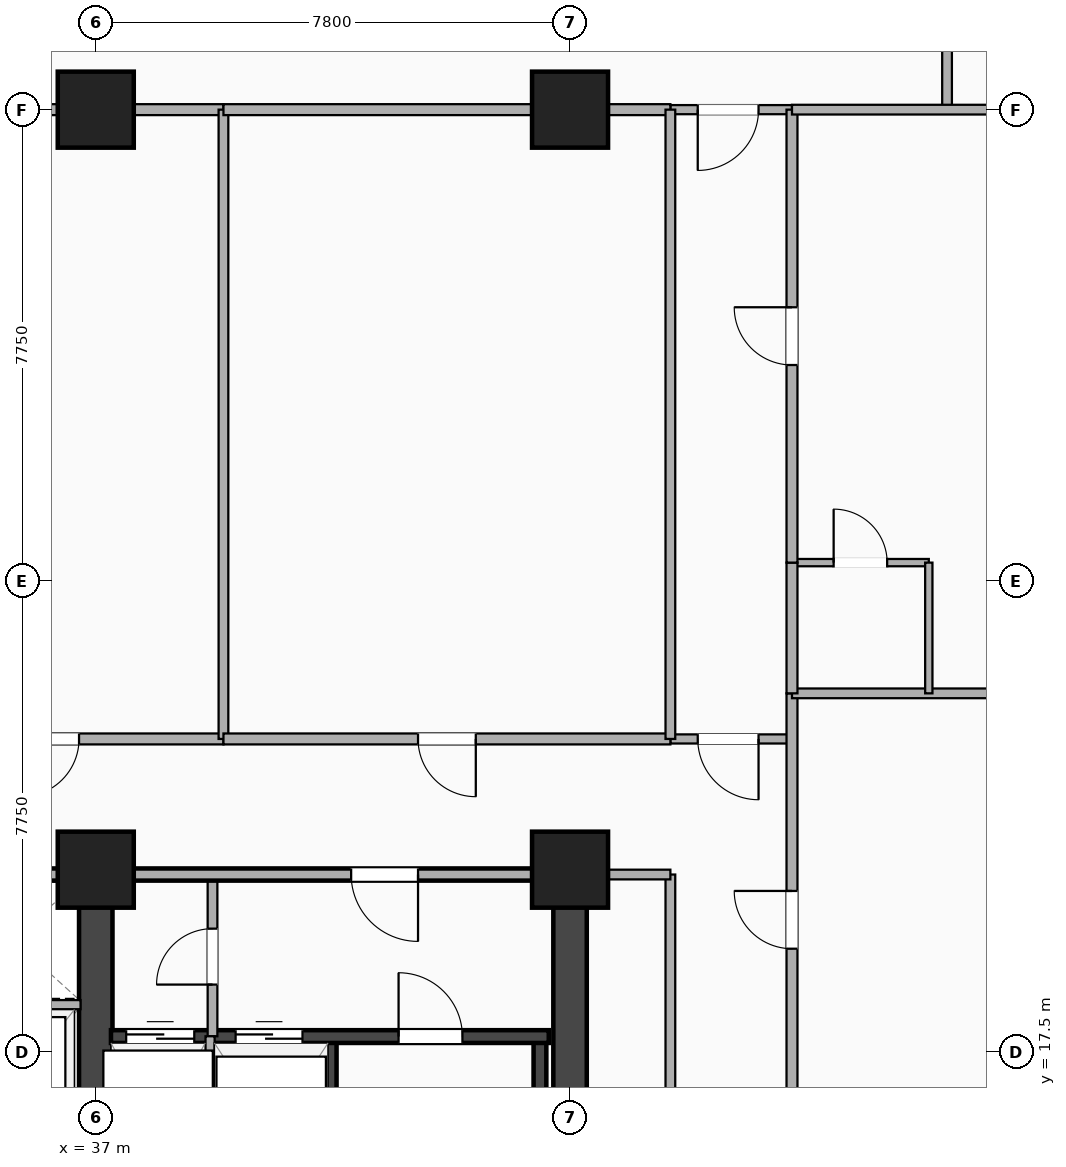
"""IFC4 building model, lengths in metres.
Left out: names, types, materials, properties, quantities, classifications, styles, units other than length and angle.
Written with IfcOpenShell. Run it as: python <this file> out.ifc"""

import sys

from ifc_helpers import new_model, si_unit, direction, frame, frame_2d, origin, origin_2d, place, context, subcontext, project, spatial, rectangle, extrude, element, fill, save


model = new_model("IFC4")
c1 = context("Model", 3, precision=1e-05, world=origin(), true_north=direction((0.0, 1.0)))
c2 = subcontext(c1, "Body", "Model", "MODEL_VIEW")
j1 = project(units=[si_unit("LENGTHUNIT", "METRE"), si_unit("PLANEANGLEUNIT", "RADIAN")], contexts=[c1])
p1 = place(None, origin())
s1 = spatial("IfcSite", under=j1, at=p1, CompositionType="ELEMENT")
p2 = place(p1, origin())
s2 = spatial("IfcBuilding", under=s1, at=p2, CompositionType="ELEMENT")
p3 = place(p2, frame((0.0, 0.0, 95.2)))
s3 = spatial("IfcBuildingStorey", under=s2, at=p3, CompositionType="ELEMENT", Elevation=95.2)
p4 = place(p3, frame((44.8, 3.5, 0.0), z_axis=(0.0, 0.0, 1.0), x_axis=(0.0, 1.0, 0.0)))
e1 = element("IfcWall", 1, at=p4, inside=s3, PredefinedType="SHEAR", context=c2, shape_type="SweptSolid", body=[
    extrude(rectangle(XDim=16.9, YDim=0.55, at=frame_2d((8.45, 0.0))), origin(), (0.0, 0.0, 1.0), 3.24),
])
p5 = place(p3, frame((37.0, 3.5, 0.0), z_axis=(0.0, 0.0, 1.0), x_axis=(0.0, 1.0, 0.0)))
e2 = element("IfcWall", 2, at=p5, inside=s3, PredefinedType="SHEAR", context=c2, shape_type="SweptSolid", body=[
    extrude(rectangle(XDim=16.9, YDim=0.55, at=frame_2d((8.45, 0.0))), origin(), (0.0, 0.0, 1.0), 3.24),
])
p6 = place(p5, frame((6.65, 0.0, 0.0)))
e3 = element("IfcOpeningElement", 3, at=p6, cuts=e2, PredefinedType="OPENING", context=c2, shape_type="SweptSolid", body=[
    extrude(rectangle(XDim=1.1, YDim=2.15, at=frame_2d((0.55, 1.075))), frame((0.0, 0.285, 0.0), z_axis=(0.0, -1.0, 0.0), x_axis=(1.0, 0.0, 0.0)), (0.0, 0.0, 1.0), 0.57),
])
for number, where, z_axis, x_axis in (
    (4, (40.855, 9.745, 0.0), (0.0, 0.0, 1.0), (0.0, 1.0, 0.0)),
    (5, (44.305, 9.745, 0.0), (0.0, 0.0, 1.0), (0.0, 1.0, 0.0)),
):
    element("IfcWall", number, at=place(p3, frame(where, z_axis=z_axis, x_axis=x_axis)), inside=s3, PredefinedType="SHEAR", context=c2, shape_type="SweptSolid", body=[
        extrude(rectangle(XDim=8.01, YDim=0.21, at=frame_2d((4.005, 0.0))), origin(), (0.0, 0.0, 1.0), 3.24),
    ])
p7 = place(p3, frame((37.25, 17.755, 0.0), z_axis=(0.0, 0.0, 1.0), x_axis=(1.0, 0.0, 0.0)))
e6 = element("IfcWall", 6, at=p7, inside=s3, PredefinedType="SHEAR", context=c2, shape_type="SweptSolid", body=[
    extrude(rectangle(XDim=7.2, YDim=0.21, at=frame_2d((3.6, 0.0))), origin(), (0.0, 0.0, 1.0), 3.24),
])
p8 = place(p7, frame((0.25, 0.0, 0.0)))
e7 = element("IfcOpeningElement", 7, at=p8, cuts=e6, PredefinedType="OPENING", context=c2, shape_type="SweptSolid", body=[
    extrude(rectangle(XDim=1.12, YDim=2.2, at=frame_2d((0.56, 1.1))), frame((0.0, 0.115, 0.0), z_axis=(0.0, -1.0, 0.0), x_axis=(1.0, 0.0, 0.0)), (0.0, 0.0, 1.0), 0.23),
])
p9 = place(p7, frame((2.05, 0.0, 0.0)))
e8 = element("IfcOpeningElement", 8, at=p9, cuts=e6, PredefinedType="OPENING", context=c2, shape_type="SweptSolid", body=[
    extrude(rectangle(XDim=1.1, YDim=2.18, at=frame_2d((0.55, 1.09))), frame((0.0, 0.115, 0.0), z_axis=(0.0, -1.0, 0.0), x_axis=(1.0, 0.0, 0.0)), (0.0, 0.0, 1.0), 0.23),
])
p10 = place(p7, frame((5.78, 0.0, 0.0), z_axis=(0.0, 0.0, 1.0), x_axis=(-1.0, 0.0, 0.0)))
e9 = element("IfcOpeningElement", 9, at=p10, cuts=e6, PredefinedType="OPENING", context=c2, shape_type="SweptSolid", body=[
    extrude(rectangle(XDim=1.05, YDim=2.15, at=frame_2d((0.525, 1.075))), frame((0.0, 0.115, 0.0), z_axis=(0.0, -1.0, 0.0), x_axis=(1.0, 0.0, 0.0)), (0.0, 0.0, 1.0), 0.23),
])
for number, where, z_axis, x_axis in (
    (10, (37.0, 20.5, -0.26), (0.0, 0.0, 1.0), (1.0, 0.0, 0.0)),
    (11, (44.8, 20.5, -0.26), (0.0, 0.0, 1.0), (1.0, 0.0, 0.0)),
    (12, (37.0, 33.0, -0.26), (0.0, 0.0, 1.0), (1.0, 0.0, 0.0)),
    (13, (44.8, 33.0, -0.26), (0.0, 0.0, 1.0), (1.0, 0.0, 0.0)),
):
    element("IfcColumn", number, at=place(p3, frame(where, z_axis=z_axis, x_axis=x_axis)), inside=s3, PredefinedType="COLUMN", context=c2, shape_type="SweptSolid", body=[
        extrude(rectangle(XDim=1.25, YDim=1.25, at=origin_2d()), origin(), (0.0, 0.0, 1.0), 3.5),
    ])
p11 = place(p3, frame((38.92, 17.76, 0.0), z_axis=(0.0, 0.0, 1.0), x_axis=(0.0, 1.0, 0.0)))
e14 = element("IfcWall", 14, at=p11, inside=s3, PredefinedType="PARTITIONING", context=c2, shape_type="SweptSolid", body=[
    extrude(rectangle(XDim=2.66, YDim=0.16, at=frame_2d((1.33, 0.0))), origin(), (0.0, 0.0, 1.0), 2.614),
])
p12 = place(p11, frame((1.77, 0.0, 0.0), z_axis=(0.0, 0.0, 1.0), x_axis=(-1.0, 0.0, 0.0)))
e15 = element("IfcOpeningElement", 15, at=p12, cuts=e14, PredefinedType="OPENING", context=c2, shape_type="SweptSolid", body=[
    extrude(rectangle(XDim=0.92, YDim=2.08, at=frame_2d((0.46, 1.04))), frame((0.0, 0.09, 0.0), z_axis=(0.0, -1.0, 0.0), x_axis=(1.0, 0.0, 0.0)), (0.0, 0.0, 1.0), 0.18),
])
p13 = place(p3, frame((38.88, 14.72, 0.0), z_axis=(0.0, 0.0, 1.0), x_axis=(0.0, 1.0, 0.0)))
e16 = element("IfcWall", 16, at=p13, inside=s3, PredefinedType="PARTITIONING", context=c2, shape_type="SweptSolid", body=[
    extrude(rectangle(XDim=3.04, YDim=0.15, at=frame_2d((1.52, 0.0))), origin(), (0.0, 0.0, 1.0), 3.24),
])
p14 = place(p3, frame((29.2, 20.42, 0.0), z_axis=(0.0, 0.0, 1.0), x_axis=(1.0, 0.0, 0.0)))
e17 = element("IfcWall", 17, at=p14, inside=s3, PredefinedType="PARTITIONING", context=c2, shape_type="SweptSolid", body=[
    extrude(rectangle(XDim=7.8, YDim=0.2, at=frame_2d((3.9, 0.0))), origin(), (0.0, 0.0, 1.0), 2.313),
])
p15 = place(p14, frame((3.55, 0.0, 0.0)))
e18 = element("IfcOpeningElement", 18, at=p15, cuts=e17, PredefinedType="OPENING", context=c2, shape_type="SweptSolid", body=[
    extrude(rectangle(XDim=1.1, YDim=2.15, at=frame_2d((0.55, 1.075))), frame((0.0, 0.11, 0.0), z_axis=(0.0, -1.0, 0.0), x_axis=(1.0, 0.0, 0.0)), (0.0, 0.0, 1.0), 0.22),
])
p16 = place(p3, frame((37.0, 20.42, 0.0), z_axis=(0.0, 0.0, 1.0), x_axis=(1.0, 0.0, 0.0)))
e19 = element("IfcWall", 19, at=p16, inside=s3, PredefinedType="PARTITIONING", context=c2, shape_type="SweptSolid", body=[
    extrude(rectangle(XDim=7.45, YDim=0.2, at=frame_2d((3.725, 0.0))), origin(), (0.0, 0.0, 1.0), 2.313),
])
p17 = place(p16, frame((4.2, 0.0, 0.0)))
e20 = element("IfcOpeningElement", 20, at=p17, cuts=e19, PredefinedType="OPENING", context=c2, shape_type="SweptSolid", body=[
    extrude(rectangle(XDim=1.1, YDim=2.15, at=frame_2d((0.55, 1.075))), frame((0.0, 0.11, 0.0), z_axis=(0.0, -1.0, 0.0), x_axis=(1.0, 0.0, 0.0)), (0.0, 0.0, 1.0), 0.22),
])
p18 = place(p3, frame((34.48, 18.28, 0.0), z_axis=(0.0, 0.0, 1.0), x_axis=(1.0, 0.0, 0.0)))
e21 = element("IfcWall", 21, at=p18, inside=s3, PredefinedType="PARTITIONING", context=c2, shape_type="SweptSolid", body=[
    extrude(rectangle(XDim=2.27, YDim=0.15, at=frame_2d((1.135, 0.0))), origin(), (0.0, 0.0, 1.0), 3.24),
])
p19 = place(p3, frame((46.45, 13.8, 0.0), z_axis=(0.0, 0.0, 1.0), x_axis=(0.0, 1.0, 0.0)))
e22 = element("IfcWall", 22, at=p19, inside=s3, PredefinedType="PARTITIONING", context=c2, shape_type="SweptSolid", body=[
    extrude(rectangle(XDim=6.62, YDim=0.16, at=frame_2d((3.31, 0.0))), origin(), (0.0, 0.0, 1.0), 2.313),
])
p20 = place(p19, frame((0.4, 0.0, 0.0)))
e23 = element("IfcOpeningElement", 23, at=p20, cuts=e22, PredefinedType="OPENING", context=c2, shape_type="SweptSolid", body=[
    extrude(rectangle(XDim=0.88, YDim=2.08, at=frame_2d((0.44, 1.04))), frame((0.0, 0.09, 0.0), z_axis=(0.0, -1.0, 0.0), x_axis=(1.0, 0.0, 0.0)), (0.0, 0.0, 1.0), 0.18),
])
p21 = place(p3, frame((44.8, 20.42, 0.0), z_axis=(0.0, 0.0, 1.0), x_axis=(1.0, 0.0, 0.0)))
e24 = element("IfcWall", 24, at=p21, inside=s3, PredefinedType="PARTITIONING", context=c2, shape_type="SweptSolid", body=[
    extrude(rectangle(XDim=1.65, YDim=0.16, at=frame_2d((0.825, 0.0))), origin(), (0.0, 0.0, 1.0), 2.313),
])
p22 = place(p3, frame((46.45, 22.65, 0.0), z_axis=(0.0, 0.0, 1.0), x_axis=(1.0, 0.0, 0.0)))
e25 = element("IfcWall", 25, at=p22, inside=s3, PredefinedType="PARTITIONING", context=c2, shape_type="SweptSolid", body=[
    extrude(rectangle(XDim=2.0, YDim=0.15, at=frame_2d((1.0, 0.0))), origin(), (0.0, 0.0, 1.0), 3.24),
])
p23 = place(p22, frame((0.45, 0.0, 0.0)))
e26 = element("IfcOpeningElement", 26, at=p23, cuts=e25, PredefinedType="OPENING", context=c2, shape_type="SweptSolid", body=[
    extrude(rectangle(XDim=1.0, YDim=2.15, at=frame_2d((0.5, 1.075))), frame((0.0, 0.085, 0.0), z_axis=(0.0, -1.0, 0.0), x_axis=(1.0, 0.0, 0.0)), (0.0, 0.0, 1.0), 0.17),
])
p24 = place(p3, frame((46.45, 33.0, 0.0), z_axis=(0.0, 0.0, 1.0), x_axis=(1.0, 0.0, 0.0)))
e27 = element("IfcWall", 27, at=p24, inside=s3, PredefinedType="PARTITIONING", context=c2, shape_type="SweptSolid", body=[
    extrude(rectangle(XDim=2.0, YDim=0.15, at=frame_2d((1.0, 0.0))), origin(), (0.0, 0.0, 1.0), 2.313),
])
p25 = place(p24, frame((0.45, 0.0, 0.0)))
e28 = element("IfcOpeningElement", 28, at=p25, cuts=e27, PredefinedType="OPENING", context=c2, shape_type="SweptSolid", body=[
    extrude(rectangle(XDim=1.0, YDim=2.15, at=frame_2d((0.5, 1.075))), frame((0.0, 0.085, 0.0), z_axis=(0.0, -1.0, 0.0), x_axis=(1.0, 0.0, 0.0)), (0.0, 0.0, 1.0), 0.17),
])
p26 = place(p3, frame((51.0, 33.0, 0.0), z_axis=(0.0, 0.0, 1.0), x_axis=(0.0, 1.0, 0.0)))
e29 = element("IfcWall", 29, at=p26, inside=s3, PredefinedType="PARTITIONING", context=c2, shape_type="SweptSolid", body=[
    extrude(rectangle(XDim=2.05, YDim=0.16, at=frame_2d((1.025, 0.0))), origin(), (0.0, 0.0, 1.0), 2.313),
])
p27 = place(p3, frame((33.4, 22.65, 0.0), z_axis=(0.0, 0.0, 1.0), x_axis=(1.0, 0.0, 0.0)))
e30 = element("IfcWall", 30, at=p27, inside=s3, PredefinedType="PARTITIONING", context=c2, shape_type="SweptSolid", body=[
    extrude(rectangle(XDim=5.7, YDim=0.18, at=frame_2d((2.85, 0.0))), origin(), (0.0, 0.0, 1.0), 2.313),
])
p28 = place(p27, frame((2.375, 0.0, 0.0)))
e31 = element("IfcOpeningElement", 31, at=p28, cuts=e30, PredefinedType="OPENING", context=c2, shape_type="SweptSolid", body=[
    extrude(rectangle(XDim=0.95, YDim=2.15, at=frame_2d((0.475, 1.075))), frame((0.0, 0.1, 0.0), z_axis=(0.0, -1.0, 0.0), x_axis=(1.0, 0.0, 0.0)), (0.0, 0.0, 1.0), 0.2),
])
p29 = place(p3, frame((33.4, 33.0, 0.0), z_axis=(0.0, 0.0, 1.0), x_axis=(1.0, 0.0, 0.0)))
e32 = element("IfcWall", 32, at=p29, inside=s3, PredefinedType="PARTITIONING", context=c2, shape_type="SweptSolid", body=[
    extrude(rectangle(XDim=5.7, YDim=0.18, at=frame_2d((2.85, 0.0))), origin(), (0.0, 0.0, 1.0), 2.313),
])
p30 = place(p3, frame((39.1, 22.65, 0.0), z_axis=(0.0, 0.0, 1.0), x_axis=(0.0, 1.0, 0.0)))
e33 = element("IfcWall", 33, at=p30, inside=s3, PredefinedType="PARTITIONING", context=c2, shape_type="SweptSolid", body=[
    extrude(rectangle(XDim=10.35, YDim=0.16, at=frame_2d((5.175, 0.0))), origin(), (0.0, 0.0, 1.0), 2.614),
])
p31 = place(p3, frame((39.1, 22.65, 0.0), z_axis=(0.0, 0.0, 1.0), x_axis=(1.0, 0.0, 0.0)))
e34 = element("IfcWall", 34, at=p31, inside=s3, PredefinedType="PARTITIONING", context=c2, shape_type="SweptSolid", body=[
    extrude(rectangle(XDim=7.35, YDim=0.18, at=frame_2d((3.675, 0.0))), origin(), (0.0, 0.0, 1.0), 2.313),
])
p32 = place(p31, frame((3.2, 0.0, 0.0)))
e35 = element("IfcOpeningElement", 35, at=p32, cuts=e34, PredefinedType="OPENING", context=c2, shape_type="SweptSolid", body=[
    extrude(rectangle(XDim=0.95, YDim=2.15, at=frame_2d((0.475, 1.075))), frame((0.0, 0.1, 0.0), z_axis=(0.0, -1.0, 0.0), x_axis=(1.0, 0.0, 0.0)), (0.0, 0.0, 1.0), 0.2),
])
p33 = place(p3, frame((39.1, 33.0, 0.0), z_axis=(0.0, 0.0, 1.0), x_axis=(1.0, 0.0, 0.0)))
e36 = element("IfcWall", 36, at=p33, inside=s3, PredefinedType="PARTITIONING", context=c2, shape_type="SweptSolid", body=[
    extrude(rectangle(XDim=7.35, YDim=0.18, at=frame_2d((3.675, 0.0))), origin(), (0.0, 0.0, 1.0), 2.313),
])
p34 = place(p3, frame((46.45, 22.65, 0.0), z_axis=(0.0, 0.0, 1.0), x_axis=(0.0, 1.0, 0.0)))
e37 = element("IfcWall", 37, at=p34, inside=s3, PredefinedType="PARTITIONING", context=c2, shape_type="SweptSolid", body=[
    extrude(rectangle(XDim=10.35, YDim=0.16, at=frame_2d((5.175, 0.0))), origin(), (0.0, 0.0, 1.0), 2.313),
])
p35 = place(p3, frame((48.45, 15.95, 0.0), z_axis=(0.0, 0.0, 1.0), x_axis=(0.0, 1.0, 0.0)))
e38 = element("IfcWall", 38, at=p35, inside=s3, PredefinedType="PARTITIONING", context=c2, shape_type="SweptSolid", body=[
    extrude(rectangle(XDim=7.45, YDim=0.18, at=frame_2d((3.725, 0.0))), origin(), (0.0, 0.0, 1.0), 2.313),
])
p36 = place(p35, frame((4.2, 0.0, 0.0), z_axis=(0.0, 0.0, 1.0), x_axis=(-1.0, 0.0, 0.0)))
e39 = element("IfcOpeningElement", 39, at=p36, cuts=e38, PredefinedType="OPENING", context=c2, shape_type="SweptSolid", body=[
    extrude(rectangle(XDim=0.95, YDim=2.15, at=frame_2d((0.475, 1.075))), frame((0.0, 0.1, 0.0), z_axis=(0.0, -1.0, 0.0), x_axis=(1.0, 0.0, 0.0)), (0.0, 0.0, 1.0), 0.2),
])
p37 = place(p3, frame((48.45, 23.4, 0.0), z_axis=(0.0, 0.0, 1.0), x_axis=(1.0, 0.0, 0.0)))
e40 = element("IfcWall", 40, at=p37, inside=s3, PredefinedType="PARTITIONING", context=c2, shape_type="SweptSolid", body=[
    extrude(rectangle(XDim=10.43, YDim=0.16, at=frame_2d((5.215, 0.0))), origin(), (0.0, 0.0, 1.0), 2.603),
])
p38 = place(p3, frame((48.45, 25.55, 0.0), z_axis=(0.0, 0.0, 1.0), x_axis=(1.0, 0.0, 0.0)))
e41 = element("IfcWall", 41, at=p38, inside=s3, PredefinedType="PARTITIONING", context=c2, shape_type="SweptSolid", body=[
    extrude(rectangle(XDim=2.25, YDim=0.12, at=frame_2d((1.125, 0.0))), origin(), (0.0, 0.0, 1.0), 3.24),
])
p39 = place(p38, frame((1.565, 0.0, 0.0), z_axis=(0.0, 0.0, 1.0), x_axis=(-1.0, 0.0, 0.0)))
e42 = element("IfcOpeningElement", 42, at=p39, cuts=e41, PredefinedType="OPENING", context=c2, shape_type="SweptSolid", body=[
    extrude(rectangle(XDim=0.88, YDim=2.08, at=frame_2d((0.44, 1.04))), frame((0.0, 0.07, 0.0), z_axis=(0.0, -1.0, 0.0), x_axis=(1.0, 0.0, 0.0)), (0.0, 0.0, 1.0), 0.14),
])
p40 = place(p3, frame((50.7, 23.4, 0.0), z_axis=(0.0, 0.0, 1.0), x_axis=(0.0, 1.0, 0.0)))
e43 = element("IfcWall", 43, at=p40, inside=s3, PredefinedType="PARTITIONING", context=c2, shape_type="SweptSolid", body=[
    extrude(rectangle(XDim=2.15, YDim=0.12, at=frame_2d((1.075, 0.0))), origin(), (0.0, 0.0, 1.0), 2.818),
])
p41 = place(p3, frame((48.45, 23.4, 0.0), z_axis=(0.0, 0.0, 1.0), x_axis=(0.0, 1.0, 0.0)))
e44 = element("IfcWall", 44, at=p41, inside=s3, PredefinedType="PARTITIONING", context=c2, shape_type="SweptSolid", body=[
    extrude(rectangle(XDim=2.15, YDim=0.18, at=frame_2d((1.075, 0.0))), origin(), (0.0, 0.0, 1.0), 2.818),
])
p42 = place(p3, frame((48.45, 25.55, 0.0), z_axis=(0.0, 0.0, 1.0), x_axis=(0.0, 1.0, 0.0)))
e45 = element("IfcWall", 45, at=p42, inside=s3, PredefinedType="PARTITIONING", context=c2, shape_type="SweptSolid", body=[
    extrude(rectangle(XDim=7.45, YDim=0.18, at=frame_2d((3.725, 0.0))), origin(), (0.0, 0.0, 1.0), 2.313),
])
p43 = place(p42, frame((4.2, 0.0, 0.0), z_axis=(0.0, 0.0, 1.0), x_axis=(-1.0, 0.0, 0.0)))
e46 = element("IfcOpeningElement", 46, at=p43, cuts=e45, PredefinedType="OPENING", context=c2, shape_type="SweptSolid", body=[
    extrude(rectangle(XDim=0.95, YDim=2.15, at=frame_2d((0.475, 1.075))), frame((0.0, 0.1, 0.0), z_axis=(0.0, -1.0, 0.0), x_axis=(1.0, 0.0, 0.0)), (0.0, 0.0, 1.0), 0.2),
])
p44 = place(p3, frame((48.45, 33.0, 0.0), z_axis=(0.0, 0.0, 1.0), x_axis=(1.0, 0.0, 0.0)))
e47 = element("IfcWall", 47, at=p44, inside=s3, PredefinedType="PARTITIONING", context=c2, shape_type="SweptSolid", body=[
    extrude(rectangle(XDim=10.43, YDim=0.16, at=frame_2d((5.215, 0.0))), origin(), (0.0, 0.0, 1.0), 2.313),
])
p45 = place(p8, origin())
e48 = element("IfcDoor", 48, at=p45, inside=s3, OperationType="DOUBLE_DOOR_SLIDING", PredefinedType="DOOR", context=c2, shape_type="SweptSolid", body=[
    extrude(rectangle(XDim=1.12, YDim=2.2, at=frame_2d((0.56, 1.1))), frame((0.0, 0.025, 0.0), z_axis=(0.0, -1.0, 0.0), x_axis=(1.0, 0.0, 0.0)), (0.0, 0.0, 1.0), 0.05),
])
fill(e7, e48)
p46 = place(p9, origin())
e49 = element("IfcDoor", 49, at=p46, inside=s3, OperationType="DOUBLE_DOOR_SLIDING", PredefinedType="DOOR", context=c2, shape_type="SweptSolid", body=[
    extrude(rectangle(XDim=1.1, YDim=2.18, at=frame_2d((0.55, 1.09))), frame((0.0, 0.025, 0.0), z_axis=(0.0, -1.0, 0.0), x_axis=(1.0, 0.0, 0.0)), (0.0, 0.0, 1.0), 0.05),
])
fill(e8, e49)
p47 = place(p10, origin())
e50 = element("IfcDoor", 50, at=p47, inside=s3, OperationType="SINGLE_SWING_LEFT", PredefinedType="DOOR", context=c2, shape_type="SweptSolid", body=[
    extrude(rectangle(XDim=1.05, YDim=2.15, at=frame_2d((0.525, 1.075))), frame((0.0, 0.025, 0.0), z_axis=(0.0, -1.0, 0.0), x_axis=(1.0, 0.0, 0.0)), (0.0, 0.0, 1.0), 0.05),
])
fill(e9, e50)
p48 = place(p12, origin())
e51 = element("IfcDoor", 51, at=p48, inside=s3, OperationType="SINGLE_SWING_LEFT", PredefinedType="DOOR", context=c2, shape_type="SweptSolid", body=[
    extrude(rectangle(XDim=0.92, YDim=2.08, at=frame_2d((0.46, 1.04))), frame((0.0, 0.025, 0.0), z_axis=(0.0, -1.0, 0.0), x_axis=(1.0, 0.0, 0.0)), (0.0, 0.0, 1.0), 0.05),
])
fill(e15, e51)
p49 = place(p17, origin())
e52 = element("IfcDoor", 52, at=p49, inside=s3, OperationType="SINGLE_SWING_RIGHT", PredefinedType="DOOR", context=c2, shape_type="SweptSolid", body=[
    extrude(rectangle(XDim=1.1, YDim=2.15, at=frame_2d((0.55, 1.075))), frame((0.0, 0.025, 0.0), z_axis=(0.0, -1.0, 0.0), x_axis=(1.0, 0.0, 0.0)), (0.0, 0.0, 1.0), 0.05),
])
fill(e20, e52)
p50 = place(p23, origin())
e53 = element("IfcDoor", 53, at=p50, inside=s3, OperationType="SINGLE_SWING_RIGHT", PredefinedType="DOOR", context=c2, shape_type="SweptSolid", body=[
    extrude(rectangle(XDim=1.0, YDim=2.15, at=frame_2d((0.5, 1.075))), frame((0.0, 0.025, 0.0), z_axis=(0.0, -1.0, 0.0), x_axis=(1.0, 0.0, 0.0)), (0.0, 0.0, 1.0), 0.05),
])
fill(e26, e53)
p51 = place(p25, origin())
e54 = element("IfcDoor", 54, at=p51, inside=s3, OperationType="SINGLE_SWING_LEFT", PredefinedType="DOOR", context=c2, shape_type="SweptSolid", body=[
    extrude(rectangle(XDim=1.0, YDim=2.15, at=frame_2d((0.5, 1.075))), frame((0.0, 0.025, 0.0), z_axis=(0.0, -1.0, 0.0), x_axis=(1.0, 0.0, 0.0)), (0.0, 0.0, 1.0), 0.05),
])
fill(e28, e54)
p52 = place(p28, origin())
e55 = element("IfcDoor", 55, at=p52, inside=s3, OperationType="SINGLE_SWING_LEFT", PredefinedType="DOOR", context=c2, shape_type="SweptSolid", body=[
    extrude(rectangle(XDim=0.95, YDim=2.15, at=frame_2d((0.475, 1.075))), frame((0.0, 0.025, 0.0), z_axis=(0.0, -1.0, 0.0), x_axis=(1.0, 0.0, 0.0)), (0.0, 0.0, 1.0), 0.05),
])
fill(e31, e55)
p53 = place(p32, origin())
e56 = element("IfcDoor", 56, at=p53, inside=s3, OperationType="SINGLE_SWING_RIGHT", PredefinedType="DOOR", context=c2, shape_type="SweptSolid", body=[
    extrude(rectangle(XDim=0.95, YDim=2.15, at=frame_2d((0.475, 1.075))), frame((0.0, 0.025, 0.0), z_axis=(0.0, -1.0, 0.0), x_axis=(1.0, 0.0, 0.0)), (0.0, 0.0, 1.0), 0.05),
])
fill(e35, e56)
p54 = place(p36, origin())
e57 = element("IfcDoor", 57, at=p54, inside=s3, OperationType="SINGLE_SWING_RIGHT", PredefinedType="DOOR", context=c2, shape_type="SweptSolid", body=[
    extrude(rectangle(XDim=0.95, YDim=2.15, at=frame_2d((0.475, 1.075))), frame((0.0, 0.025, 0.0), z_axis=(0.0, -1.0, 0.0), x_axis=(1.0, 0.0, 0.0)), (0.0, 0.0, 1.0), 0.05),
])
fill(e39, e57)
p55 = place(p39, origin())
e58 = element("IfcDoor", 58, at=p55, inside=s3, OperationType="SINGLE_SWING_LEFT", PredefinedType="DOOR", context=c2, shape_type="SweptSolid", body=[
    extrude(rectangle(XDim=0.88, YDim=2.08, at=frame_2d((0.44, 1.04))), frame((0.0, 0.025, 0.0), z_axis=(0.0, -1.0, 0.0), x_axis=(1.0, 0.0, 0.0)), (0.0, 0.0, 1.0), 0.05),
])
fill(e42, e58)
p56 = place(p43, origin())
e59 = element("IfcDoor", 59, at=p56, inside=s3, OperationType="SINGLE_SWING_RIGHT", PredefinedType="DOOR", context=c2, shape_type="SweptSolid", body=[
    extrude(rectangle(XDim=0.95, YDim=2.15, at=frame_2d((0.475, 1.075))), frame((0.0, 0.025, 0.0), z_axis=(0.0, -1.0, 0.0), x_axis=(1.0, 0.0, 0.0)), (0.0, 0.0, 1.0), 0.05),
])
fill(e46, e59)
save(model, sys.argv[1])
